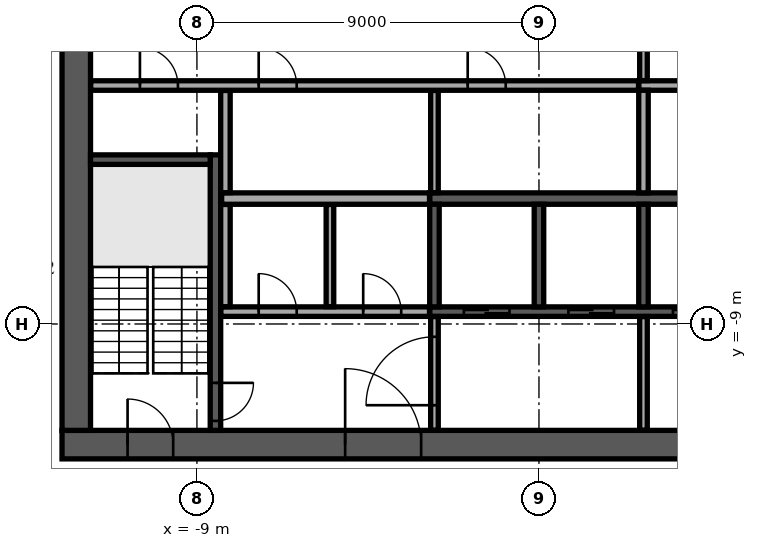
"""IFC4 building model, lengths in metres.
Left out: names, types, materials, properties, quantities, classifications, styles, units other than length and angle.
Written with IfcOpenShell. Run it as: python <this file> out.ifc"""

import sys

from ifc_helpers import new_model, si_unit, direction, frame, frame_2d, origin, place, context, subcontext, project, spatial, rectangle, extrude, element, fill, save


model = new_model("IFC4")
c1 = context("Model", 3, precision=1e-05, world=origin(), true_north=direction((0.0, 1.0)))
c2 = subcontext(c1, "Body", "Model", "MODEL_VIEW")
j1 = project(units=[si_unit("LENGTHUNIT", "METRE"), si_unit("PLANEANGLEUNIT", "RADIAN")], contexts=[c1])
p1 = place(None, origin())
s1 = spatial("IfcSite", under=j1, at=p1, CompositionType="ELEMENT")
p2 = place(p1, origin())
s2 = spatial("IfcBuilding", under=s1, at=p2, CompositionType="ELEMENT")
p3 = place(p2, frame((0.0, 0.0, 282.9)))
s3 = spatial("IfcBuildingStorey", under=s2, at=p3, CompositionType="ELEMENT", Elevation=282.9)
p4 = place(p3, frame((-12.55, -12.175, 0.0), z_axis=(0.0, 0.0, 1.0), x_axis=(1.0, 0.0, 0.0)))
e1 = element("IfcWall", 1, at=p4, inside=s3, PredefinedType="SHEAR", context=c2, shape_type="SweptSolid", body=[
    extrude(rectangle(XDim=25.1, YDim=0.75, at=frame_2d((12.55, 0.0))), origin(), (0.0, 0.0, 1.0), 3.64),
])
p5 = place(p4, frame((7.45, 0.0, 0.0)))
e2 = element("IfcOpeningElement", 2, at=p5, cuts=e1, PredefinedType="OPENING", context=c2, shape_type="SweptSolid", body=[
    extrude(rectangle(XDim=2.0, YDim=2.1, at=frame_2d((1.0, 1.05))), frame((0.0, 0.385, 0.0), z_axis=(0.0, -1.0, 0.0), x_axis=(1.0, 0.0, 0.0)), (0.0, 0.0, 1.0), 0.77),
])
p6 = place(p4, frame((17.575, 0.0, 0.0)))
e3 = element("IfcOpeningElement", 3, at=p6, cuts=e1, PredefinedType="OPENING", context=c2, shape_type="SweptSolid", body=[
    extrude(rectangle(XDim=1.2, YDim=2.1, at=frame_2d((0.6, 1.05))), frame((0.0, 0.385, 0.0), z_axis=(0.0, -1.0, 0.0), x_axis=(1.0, 0.0, 0.0)), (0.0, 0.0, 1.0), 0.77),
])
p7 = place(p4, frame((1.725, 0.0, 0.0)))
e4 = element("IfcOpeningElement", 4, at=p7, cuts=e1, PredefinedType="OPENING", context=c2, shape_type="SweptSolid", body=[
    extrude(rectangle(XDim=1.2, YDim=2.1, at=frame_2d((0.6, 1.05))), frame((0.0, 0.385, 0.0), z_axis=(0.0, -1.0, 0.0), x_axis=(1.0, 0.0, 0.0)), (0.0, 0.0, 1.0), 0.77),
])
p8 = place(p4, frame((22.175, 0.0, 0.0)))
e5 = element("IfcOpeningElement", 5, at=p8, cuts=e1, PredefinedType="OPENING", context=c2, shape_type="SweptSolid", body=[
    extrude(rectangle(XDim=1.2, YDim=2.1, at=frame_2d((0.6, 1.05))), frame((0.0, 0.385, 0.0), z_axis=(0.0, -1.0, 0.0), x_axis=(1.0, 0.0, 0.0)), (0.0, 0.0, 1.0), 0.77),
])
p9 = place(p3, frame((-12.175, -11.8, 0.0), z_axis=(0.0, 0.0, 1.0), x_axis=(0.0, 1.0, 0.0)))
e6 = element("IfcWall", 6, at=p9, inside=s3, PredefinedType="SHEAR", context=c2, shape_type="SweptSolid", body=[
    extrude(rectangle(XDim=23.6, YDim=0.75, at=frame_2d((11.8, 0.0))), origin(), (0.0, 0.0, 1.0), 3.64),
])
p10 = place(p9, frame((10.6, 0.0, 0.0)))
e7 = element("IfcOpeningElement", 7, at=p10, cuts=e6, PredefinedType="OPENING", context=c2, shape_type="SweptSolid", body=[
    extrude(rectangle(XDim=2.4, YDim=2.4, at=frame_2d((1.2, 1.2))), frame((0.0, 0.385, 0.0), z_axis=(0.0, -1.0, 0.0), x_axis=(1.0, 0.0, 0.0)), (0.0, 0.0, 1.0), 0.77),
])
p11 = place(p3, frame((-2.875, -5.7, 0.0), z_axis=(0.0, 0.0, 1.0), x_axis=(1.0, 0.0, 0.0)))
e8 = element("IfcWall", 8, at=p11, inside=s3, PredefinedType="SOLIDWALL", context=c2, shape_type="SweptSolid", body=[
    extrude(rectangle(XDim=11.25, YDim=0.3, at=frame_2d((5.625, 0.0))), origin(), (0.0, 0.0, 1.0), 3.64),
])
p12 = place(p3, frame((2.625, -2.725, 0.0), z_axis=(0.0, 0.0, 1.0), x_axis=(1.0, 0.0, 0.0)))
e9 = element("IfcWall", 9, at=p12, inside=s3, PredefinedType="SOLIDWALL", context=c2, shape_type="SweptSolid", body=[
    extrude(rectangle(XDim=3.0, YDim=0.25, at=frame_2d((1.5, 0.0))), origin(), (0.0, 0.0, 1.0), 3.64),
])
p13 = place(p3, frame((2.75, -5.55, 0.0), z_axis=(0.0, 0.0, 1.0), x_axis=(0.0, 1.0, 0.0)))
e10 = element("IfcWall", 10, at=p13, inside=s3, PredefinedType="SOLIDWALL", context=c2, shape_type="SweptSolid", body=[
    extrude(rectangle(XDim=2.7, YDim=0.25, at=frame_2d((1.35, 0.0))), origin(), (0.0, 0.0, 1.0), 3.64),
])
p14 = place(p3, frame((-2.875, -8.675, 0.0), z_axis=(0.0, 0.0, 1.0), x_axis=(1.0, 0.0, 0.0)))
e11 = element("IfcWall", 11, at=p14, inside=s3, PredefinedType="SOLIDWALL", context=c2, shape_type="SweptSolid", body=[
    extrude(rectangle(XDim=11.25, YDim=0.25, at=frame_2d((5.625, 0.0))), origin(), (0.0, 0.0, 1.0), 3.64),
])
p15 = place(p14, frame((0.9, 0.0, 0.0)))
e12 = element("IfcOpeningElement", 12, at=p15, cuts=e11, PredefinedType="OPENING", context=c2, shape_type="SweptSolid", body=[
    extrude(rectangle(XDim=1.2, YDim=2.1, at=frame_2d((0.6, 1.05))), frame((0.0, 0.135, 0.0), z_axis=(0.0, -1.0, 0.0), x_axis=(1.0, 0.0, 0.0)), (0.0, 0.0, 1.0), 0.27),
])
p16 = place(p14, frame((3.65, 0.0, 0.0)))
e13 = element("IfcOpeningElement", 13, at=p16, cuts=e11, PredefinedType="OPENING", context=c2, shape_type="SweptSolid", body=[
    extrude(rectangle(XDim=1.2, YDim=2.1, at=frame_2d((0.6, 1.05))), frame((0.0, 0.135, 0.0), z_axis=(0.0, -1.0, 0.0), x_axis=(1.0, 0.0, 0.0)), (0.0, 0.0, 1.0), 0.27),
])
p17 = place(p14, frame((6.4, 0.0, 0.0)))
e14 = element("IfcOpeningElement", 14, at=p17, cuts=e11, PredefinedType="OPENING", context=c2, shape_type="SweptSolid", body=[
    extrude(rectangle(XDim=1.2, YDim=2.1, at=frame_2d((0.6, 1.05))), frame((0.0, 0.135, 0.0), z_axis=(0.0, -1.0, 0.0), x_axis=(1.0, 0.0, 0.0)), (0.0, 0.0, 1.0), 0.27),
])
p18 = place(p14, frame((9.15, 0.0, 0.0)))
e15 = element("IfcOpeningElement", 15, at=p18, cuts=e11, PredefinedType="OPENING", context=c2, shape_type="SweptSolid", body=[
    extrude(rectangle(XDim=1.2, YDim=2.1, at=frame_2d((0.6, 1.05))), frame((0.0, 0.135, 0.0), z_axis=(0.0, -1.0, 0.0), x_axis=(1.0, 0.0, 0.0)), (0.0, 0.0, 1.0), 0.27),
])
for number, where, z_axis, x_axis in (
    (16, (-2.75, -8.55, 0.0), (0.0, 0.0, 1.0), (0.0, 1.0, 0.0)),
    (17, (0.0, -8.55, 0.0), (0.0, 0.0, 1.0), (0.0, 1.0, 0.0)),
    (18, (2.75, -8.55, 0.0), (0.0, 0.0, 1.0), (0.0, 1.0, 0.0)),
):
    element("IfcWall", number, at=place(p3, frame(where, z_axis=z_axis, x_axis=x_axis)), inside=s3, PredefinedType="SOLIDWALL", context=c2, shape_type="SweptSolid", body=[
        extrude(rectangle(XDim=2.7, YDim=0.25, at=frame_2d((1.35, 0.0))), origin(), (0.0, 0.0, 1.0), 3.64),
    ])
p19 = place(p3, frame((-8.512, -4.55, 0.0), z_axis=(0.0, 0.0, 1.0), x_axis=(0.0, -1.0, 0.0)))
e19 = element("IfcWall", 19, at=p19, inside=s3, PredefinedType="SOLIDWALL", context=c2, shape_type="SweptSolid", body=[
    extrude(rectangle(XDim=7.25, YDim=0.275, at=frame_2d((3.625, 0.0))), origin(), (0.0, 0.0, 1.0), 3.64),
])
p20 = place(p19, frame((6.0, 0.0, 0.0)))
e20 = element("IfcOpeningElement", 20, at=p20, cuts=e19, PredefinedType="OPENING", context=c2, shape_type="SweptSolid", body=[
    extrude(rectangle(XDim=1.0, YDim=2.1, at=frame_2d((0.5, 1.05))), frame((0.0, 0.147, 0.0), z_axis=(0.0, -1.0, 0.0), x_axis=(1.0, 0.0, 0.0)), (0.0, 0.0, 1.0), 0.295),
])
p21 = place(p3, frame((-8.65, -4.675, 0.0), z_axis=(0.0, 0.0, 1.0), x_axis=(-1.0, 0.0, 0.0)))
e21 = element("IfcWall", 21, at=p21, inside=s3, PredefinedType="SOLIDWALL", context=c2, shape_type="SweptSolid", body=[
    extrude(rectangle(XDim=3.15, YDim=0.25, at=frame_2d((1.575, 0.0))), origin(), (0.0, 0.0, 1.0), 3.64),
])
p22 = place(p3, frame((-2.75, -11.795, 0.0), z_axis=(0.0, 0.0, 1.0), x_axis=(0.0, 1.0, 0.0)))
e22 = element("IfcWall", 22, at=p22, inside=s3, PredefinedType="PARTITIONING", context=c2, shape_type="SweptSolid", body=[
    extrude(rectangle(XDim=2.99, YDim=0.2, at=frame_2d((1.495, 0.0))), origin(), (0.0, 0.0, 1.0), 3.64),
])
p23 = place(p22, frame((0.657, 0.0, 0.0)))
e23 = element("IfcOpeningElement", 23, at=p23, cuts=e22, PredefinedType="OPENING", context=c2, shape_type="SweptSolid", body=[
    extrude(rectangle(XDim=1.8, YDim=2.1, at=frame_2d((0.9, 1.05))), frame((0.0, 0.11, 0.0), z_axis=(0.0, -1.0, 0.0), x_axis=(1.0, 0.0, 0.0)), (0.0, 0.0, 1.0), 0.22),
])
p24 = place(p3, frame((2.75, -11.795, 0.0), z_axis=(0.0, 0.0, 1.0), x_axis=(0.0, 1.0, 0.0)))
e24 = element("IfcWall", 24, at=p24, inside=s3, PredefinedType="PARTITIONING", context=c2, shape_type="SweptSolid", body=[
    extrude(rectangle(XDim=2.99, YDim=0.2, at=frame_2d((1.495, 0.0))), origin(), (0.0, 0.0, 1.0), 3.64),
])
p25 = place(p3, frame((-8.37, -8.675, 0.0), z_axis=(0.0, 0.0, 1.0), x_axis=(1.0, 0.0, 0.0)))
e25 = element("IfcWall", 25, at=p25, inside=s3, PredefinedType="PARTITIONING", context=c2, shape_type="SweptSolid", body=[
    extrude(rectangle(XDim=5.49, YDim=0.25, at=frame_2d((2.745, 0.0))), origin(), (0.0, 0.0, 1.0), 3.64),
])
p26 = place(p25, frame((0.995, 0.0, 0.0)))
e26 = element("IfcOpeningElement", 26, at=p26, cuts=e25, PredefinedType="OPENING", context=c2, shape_type="SweptSolid", body=[
    extrude(rectangle(XDim=1.0, YDim=2.1, at=frame_2d((0.5, 1.05))), frame((0.0, 0.135, 0.0), z_axis=(0.0, -1.0, 0.0), x_axis=(1.0, 0.0, 0.0)), (0.0, 0.0, 1.0), 0.27),
])
p27 = place(p25, frame((3.745, 0.0, 0.0)))
e27 = element("IfcOpeningElement", 27, at=p27, cuts=e25, PredefinedType="OPENING", context=c2, shape_type="SweptSolid", body=[
    extrude(rectangle(XDim=1.0, YDim=2.1, at=frame_2d((0.5, 1.05))), frame((0.0, 0.135, 0.0), z_axis=(0.0, -1.0, 0.0), x_axis=(1.0, 0.0, 0.0)), (0.0, 0.0, 1.0), 0.27),
])
p28 = place(p3, frame((-8.25, -8.545, 0.0), z_axis=(0.0, 0.0, 1.0), x_axis=(0.0, 1.0, 0.0)))
e28 = element("IfcWall", 28, at=p28, inside=s3, PredefinedType="PARTITIONING", context=c2, shape_type="SweptSolid", body=[
    extrude(rectangle(XDim=2.69, YDim=0.25, at=frame_2d((1.345, 0.0))), origin(), (0.0, 0.0, 1.0), 3.64),
])
p29 = place(p3, frame((-5.5, -8.545, 0.0), z_axis=(0.0, 0.0, 1.0), x_axis=(0.0, 1.0, 0.0)))
e29 = element("IfcWall", 29, at=p29, inside=s3, PredefinedType="PARTITIONING", context=c2, shape_type="SweptSolid", body=[
    extrude(rectangle(XDim=2.69, YDim=0.2, at=frame_2d((1.345, 0.0))), origin(), (0.0, 0.0, 1.0), 3.64),
])
p30 = place(p3, frame((-8.35, -5.7, 0.0), z_axis=(0.0, 0.0, 1.0), x_axis=(1.0, 0.0, 0.0)))
e30 = element("IfcWall", 30, at=p30, inside=s3, PredefinedType="PARTITIONING", context=c2, shape_type="SweptSolid", body=[
    extrude(rectangle(XDim=5.47, YDim=0.3, at=frame_2d((2.735, 0.0))), origin(), (0.0, 0.0, 1.0), 3.64),
])
p31 = place(p3, frame((-8.25, -5.545, 0.0), z_axis=(0.0, 0.0, 1.0), x_axis=(0.0, 1.0, 0.0)))
e31 = element("IfcWall", 31, at=p31, inside=s3, PredefinedType="PARTITIONING", context=c2, shape_type="SweptSolid", body=[
    extrude(rectangle(XDim=2.69, YDim=0.25, at=frame_2d((1.345, 0.0))), origin(), (0.0, 0.0, 1.0), 3.64),
])
p32 = place(p3, frame((-2.75, -5.545, 0.0), z_axis=(0.0, 0.0, 1.0), x_axis=(0.0, 1.0, 0.0)))
e32 = element("IfcWall", 32, at=p32, inside=s3, PredefinedType="PARTITIONING", context=c2, shape_type="SweptSolid", body=[
    extrude(rectangle(XDim=2.69, YDim=0.2, at=frame_2d((1.345, 0.0))), origin(), (0.0, 0.0, 1.0), 3.64),
])
p33 = place(p3, frame((-11.795, -2.725, 0.0), z_axis=(0.0, 0.0, 1.0), x_axis=(1.0, 0.0, 0.0)))
e33 = element("IfcWall", 33, at=p33, inside=s3, PredefinedType="PARTITIONING", context=c2, shape_type="SweptSolid", body=[
    extrude(rectangle(XDim=14.415, YDim=0.25, at=frame_2d((7.208, 0.0))), origin(), (0.0, 0.0, 1.0), 3.64),
])
p34 = place(p33, frame((1.295, 0.0, 0.0)))
e34 = element("IfcOpeningElement", 34, at=p34, cuts=e33, PredefinedType="OPENING", context=c2, shape_type="SweptSolid", body=[
    extrude(rectangle(XDim=1.0, YDim=2.1, at=frame_2d((0.5, 1.05))), frame((0.0, 0.135, 0.0), z_axis=(0.0, -1.0, 0.0), x_axis=(1.0, 0.0, 0.0)), (0.0, 0.0, 1.0), 0.27),
])
p35 = place(p33, frame((4.42, 0.0, 0.0)))
e35 = element("IfcOpeningElement", 35, at=p35, cuts=e33, PredefinedType="OPENING", context=c2, shape_type="SweptSolid", body=[
    extrude(rectangle(XDim=1.0, YDim=2.1, at=frame_2d((0.5, 1.05))), frame((0.0, 0.135, 0.0), z_axis=(0.0, -1.0, 0.0), x_axis=(1.0, 0.0, 0.0)), (0.0, 0.0, 1.0), 0.27),
])
p36 = place(p33, frame((9.92, 0.0, 0.0)))
e36 = element("IfcOpeningElement", 36, at=p36, cuts=e33, PredefinedType="OPENING", context=c2, shape_type="SweptSolid", body=[
    extrude(rectangle(XDim=1.0, YDim=2.1, at=frame_2d((0.5, 1.05))), frame((0.0, 0.135, 0.0), z_axis=(0.0, -1.0, 0.0), x_axis=(1.0, 0.0, 0.0)), (0.0, 0.0, 1.0), 0.27),
])
p37 = place(p3, frame((2.75, -2.595, 0.0), z_axis=(0.0, 0.0, 1.0), x_axis=(0.0, 1.0, 0.0)))
e37 = element("IfcWall", 37, at=p37, inside=s3, PredefinedType="PARTITIONING", context=c2, shape_type="SweptSolid", body=[
    extrude(rectangle(XDim=5.19, YDim=0.2, at=frame_2d((2.595, 0.0))), origin(), (0.0, 0.0, 1.0), 3.64),
])
p38 = place(p37, frame((1.395, 0.0, 0.0)))
e38 = element("IfcOpeningElement", 38, at=p38, cuts=e37, PredefinedType="OPENING", context=c2, shape_type="SweptSolid", body=[
    extrude(rectangle(XDim=2.4, YDim=2.4, at=frame_2d((1.2, 1.2))), frame((0.0, 0.11, 0.0), z_axis=(0.0, -1.0, 0.0), x_axis=(1.0, 0.0, 0.0)), (0.0, 0.0, 1.0), 0.22),
])
p39 = place(p3, frame((-10.292, 32.278, 0.0), z_axis=(0.0, 0.0, 1.0), x_axis=(-0.438370550468, -0.898794337144, 0.0)))
e39 = element("IfcWall", 39, at=p39, inside=s3, PredefinedType="STANDARD", context=c2, shape_type="SweptSolid", body=[
    extrude(rectangle(XDim=48.843, YDim=0.6, at=frame_2d((24.421, 0.0))), origin(), (0.0, 0.0, 1.0), 3.64),
])
p40 = place(p39, frame((1.22, 0.0, 0.9)))
e40 = element("IfcOpeningElement", 40, at=p40, cuts=e39, PredefinedType="OPENING", context=c2, shape_type="SweptSolid", body=[
    extrude(rectangle(XDim=2.0, YDim=2.1, at=frame_2d((1.0, 1.05))), frame((0.0, 0.31, 0.0), z_axis=(0.0, -1.0, 0.0), x_axis=(1.0, 0.0, 0.0)), (0.0, 0.0, 1.0), 0.62),
])
p41 = place(p39, frame((5.66, 0.0, 0.9)))
e41 = element("IfcOpeningElement", 41, at=p41, cuts=e39, PredefinedType="OPENING", context=c2, shape_type="SweptSolid", body=[
    extrude(rectangle(XDim=2.0, YDim=2.1, at=frame_2d((1.0, 1.05))), frame((0.0, 0.31, 0.0), z_axis=(0.0, -1.0, 0.0), x_axis=(1.0, 0.0, 0.0)), (0.0, 0.0, 1.0), 0.62),
])
p42 = place(p39, frame((10.101, 0.0, 0.9)))
e42 = element("IfcOpeningElement", 42, at=p42, cuts=e39, PredefinedType="OPENING", context=c2, shape_type="SweptSolid", body=[
    extrude(rectangle(XDim=2.0, YDim=2.1, at=frame_2d((1.0, 1.05))), frame((0.0, 0.31, 0.0), z_axis=(0.0, -1.0, 0.0), x_axis=(1.0, 0.0, 0.0)), (0.0, 0.0, 1.0), 0.62),
])
p43 = place(p39, frame((14.541, 0.0, 0.9)))
e43 = element("IfcOpeningElement", 43, at=p43, cuts=e39, PredefinedType="OPENING", context=c2, shape_type="SweptSolid", body=[
    extrude(rectangle(XDim=2.0, YDim=2.1, at=frame_2d((1.0, 1.05))), frame((0.0, 0.31, 0.0), z_axis=(0.0, -1.0, 0.0), x_axis=(1.0, 0.0, 0.0)), (0.0, 0.0, 1.0), 0.62),
])
p44 = place(p39, frame((18.981, 0.0, 0.9)))
e44 = element("IfcOpeningElement", 44, at=p44, cuts=e39, PredefinedType="OPENING", context=c2, shape_type="SweptSolid", body=[
    extrude(rectangle(XDim=2.0, YDim=2.1, at=frame_2d((1.0, 1.05))), frame((0.0, 0.31, 0.0), z_axis=(0.0, -1.0, 0.0), x_axis=(1.0, 0.0, 0.0)), (0.0, 0.0, 1.0), 0.62),
])
p45 = place(p39, frame((23.422, 0.0, 0.9)))
e45 = element("IfcOpeningElement", 45, at=p45, cuts=e39, PredefinedType="OPENING", context=c2, shape_type="SweptSolid", body=[
    extrude(rectangle(XDim=2.0, YDim=2.1, at=frame_2d((1.0, 1.05))), frame((0.0, 0.31, 0.0), z_axis=(0.0, -1.0, 0.0), x_axis=(1.0, 0.0, 0.0)), (0.0, 0.0, 1.0), 0.62),
])
p46 = place(p39, frame((27.862, 0.0, 0.9)))
e46 = element("IfcOpeningElement", 46, at=p46, cuts=e39, PredefinedType="OPENING", context=c2, shape_type="SweptSolid", body=[
    extrude(rectangle(XDim=2.0, YDim=2.1, at=frame_2d((1.0, 1.05))), frame((0.0, 0.31, 0.0), z_axis=(0.0, -1.0, 0.0), x_axis=(1.0, 0.0, 0.0)), (0.0, 0.0, 1.0), 0.62),
])
p47 = place(p39, frame((32.302, 0.0, 0.9)))
e47 = element("IfcOpeningElement", 47, at=p47, cuts=e39, PredefinedType="OPENING", context=c2, shape_type="SweptSolid", body=[
    extrude(rectangle(XDim=2.0, YDim=2.1, at=frame_2d((1.0, 1.05))), frame((0.0, 0.31, 0.0), z_axis=(0.0, -1.0, 0.0), x_axis=(1.0, 0.0, 0.0)), (0.0, 0.0, 1.0), 0.62),
])
p48 = place(p39, frame((36.742, 0.0, 0.9)))
e48 = element("IfcOpeningElement", 48, at=p48, cuts=e39, PredefinedType="OPENING", context=c2, shape_type="SweptSolid", body=[
    extrude(rectangle(XDim=2.0, YDim=2.1, at=frame_2d((1.0, 1.05))), frame((0.0, 0.31, 0.0), z_axis=(0.0, -1.0, 0.0), x_axis=(1.0, 0.0, 0.0)), (0.0, 0.0, 1.0), 0.62),
])
p49 = place(p39, frame((41.183, 0.0, 0.9)))
e49 = element("IfcOpeningElement", 49, at=p49, cuts=e39, PredefinedType="OPENING", context=c2, shape_type="SweptSolid", body=[
    extrude(rectangle(XDim=2.0, YDim=2.1, at=frame_2d((1.0, 1.05))), frame((0.0, 0.31, 0.0), z_axis=(0.0, -1.0, 0.0), x_axis=(1.0, 0.0, 0.0)), (0.0, 0.0, 1.0), 0.62),
])
p50 = place(p39, frame((45.623, 0.0, 0.9)))
e50 = element("IfcOpeningElement", 50, at=p50, cuts=e39, PredefinedType="OPENING", context=c2, shape_type="SweptSolid", body=[
    extrude(rectangle(XDim=2.0, YDim=2.1, at=frame_2d((1.0, 1.05))), frame((0.0, 0.31, 0.0), z_axis=(0.0, -1.0, 0.0), x_axis=(1.0, 0.0, 0.0)), (0.0, 0.0, 1.0), 0.62),
])
p51 = place(p3, frame((-26.175, -8.898, 0.0), z_axis=(0.0, 0.0, 1.0), x_axis=(0.898795233888, -0.438368711864, 0.0)))
e51 = element("IfcWall", 51, at=p51, inside=s3, PredefinedType="PARTITIONING", context=c2, shape_type="SweptSolid", body=[
    extrude(rectangle(XDim=39.325, YDim=0.15, at=frame_2d((19.663, 0.0))), origin(), (0.0, 0.0, 1.0), 3.04),
])
p52 = place(p51, frame((5.8, 0.0, 0.0)))
e52 = element("IfcOpeningElement", 52, at=p52, cuts=e51, PredefinedType="OPENING", context=c2, shape_type="SweptSolid", body=[
    extrude(rectangle(XDim=1.8, YDim=2.1, at=frame_2d((0.9, 1.05))), frame((0.0, 0.085, 0.0), z_axis=(0.0, -1.0, 0.0), x_axis=(1.0, 0.0, 0.0)), (0.0, 0.0, 1.0), 0.17),
])
p53 = place(p51, frame((10.827, 0.0, 0.0)))
e53 = element("IfcOpeningElement", 53, at=p53, cuts=e51, PredefinedType="OPENING", context=c2, shape_type="SweptSolid", body=[
    extrude(rectangle(XDim=1.0, YDim=2.1, at=frame_2d((0.5, 1.05))), frame((0.0, 0.085, 0.0), z_axis=(0.0, -1.0, 0.0), x_axis=(1.0, 0.0, 0.0)), (0.0, 0.0, 1.0), 0.17),
])
p54 = place(p51, frame((23.556, 0.0, 0.0)))
e54 = element("IfcOpeningElement", 54, at=p54, cuts=e51, PredefinedType="OPENING", context=c2, shape_type="SweptSolid", body=[
    extrude(rectangle(XDim=1.0, YDim=2.1, at=frame_2d((0.5, 1.05))), frame((0.0, 0.085, 0.0), z_axis=(0.0, -1.0, 0.0), x_axis=(1.0, 0.0, 0.0)), (0.0, 0.0, 1.0), 0.17),
])
p55 = place(p5, origin())
e55 = element("IfcDoor", 55, at=p55, inside=s3, OperationType="SINGLE_SWING_LEFT", PredefinedType="DOOR", context=c2, shape_type="SweptSolid", body=[
    extrude(rectangle(XDim=2.0, YDim=2.1, at=frame_2d((1.0, 1.05))), frame((0.0, 0.025, 0.0), z_axis=(0.0, -1.0, 0.0), x_axis=(1.0, 0.0, 0.0)), (0.0, 0.0, 1.0), 0.05),
])
fill(e2, e55)
p56 = place(p7, origin())
e56 = element("IfcDoor", 56, at=p56, inside=s3, OperationType="SINGLE_SWING_LEFT", PredefinedType="DOOR", context=c2, shape_type="SweptSolid", body=[
    extrude(rectangle(XDim=1.2, YDim=2.1, at=frame_2d((0.6, 1.05))), frame((0.0, 0.025, 0.0), z_axis=(0.0, -1.0, 0.0), x_axis=(1.0, 0.0, 0.0)), (0.0, 0.0, 1.0), 0.05),
])
fill(e4, e56)
p57 = place(p15, origin())
e57 = element("IfcDoor", 57, at=p57, inside=s3, OperationType="DOUBLE_DOOR_SLIDING", PredefinedType="DOOR", context=c2, shape_type="SweptSolid", body=[
    extrude(rectangle(XDim=1.2, YDim=2.1, at=frame_2d((0.6, 1.05))), frame((0.0, 0.025, 0.0), z_axis=(0.0, -1.0, 0.0), x_axis=(1.0, 0.0, 0.0)), (0.0, 0.0, 1.0), 0.05),
])
fill(e12, e57)
p58 = place(p16, origin())
e58 = element("IfcDoor", 58, at=p58, inside=s3, OperationType="DOUBLE_DOOR_SLIDING", PredefinedType="DOOR", context=c2, shape_type="SweptSolid", body=[
    extrude(rectangle(XDim=1.2, YDim=2.1, at=frame_2d((0.6, 1.05))), frame((0.0, 0.025, 0.0), z_axis=(0.0, -1.0, 0.0), x_axis=(1.0, 0.0, 0.0)), (0.0, 0.0, 1.0), 0.05),
])
fill(e13, e58)
p59 = place(p17, origin())
e59 = element("IfcDoor", 59, at=p59, inside=s3, OperationType="DOUBLE_DOOR_SLIDING", PredefinedType="DOOR", context=c2, shape_type="SweptSolid", body=[
    extrude(rectangle(XDim=1.2, YDim=2.1, at=frame_2d((0.6, 1.05))), frame((0.0, 0.025, 0.0), z_axis=(0.0, -1.0, 0.0), x_axis=(1.0, 0.0, 0.0)), (0.0, 0.0, 1.0), 0.05),
])
fill(e14, e59)
p60 = place(p20, origin())
e60 = element("IfcDoor", 60, at=p60, inside=s3, OperationType="SINGLE_SWING_LEFT", PredefinedType="DOOR", context=c2, shape_type="SweptSolid", body=[
    extrude(rectangle(XDim=1.0, YDim=2.1, at=frame_2d((0.5, 1.05))), frame((0.0, 0.025, 0.0), z_axis=(0.0, -1.0, 0.0), x_axis=(1.0, 0.0, 0.0)), (0.0, 0.0, 1.0), 0.05),
])
fill(e20, e60)
p61 = place(p26, origin())
e61 = element("IfcDoor", 61, at=p61, inside=s3, OperationType="SINGLE_SWING_RIGHT", PredefinedType="DOOR", context=c2, shape_type="SweptSolid", body=[
    extrude(rectangle(XDim=1.0, YDim=2.1, at=frame_2d((0.5, 1.05))), frame((0.0, 0.025, 0.0), z_axis=(0.0, -1.0, 0.0), x_axis=(1.0, 0.0, 0.0)), (0.0, 0.0, 1.0), 0.05),
])
fill(e26, e61)
p62 = place(p27, origin())
e62 = element("IfcDoor", 62, at=p62, inside=s3, OperationType="SINGLE_SWING_RIGHT", PredefinedType="DOOR", context=c2, shape_type="SweptSolid", body=[
    extrude(rectangle(XDim=1.0, YDim=2.1, at=frame_2d((0.5, 1.05))), frame((0.0, 0.025, 0.0), z_axis=(0.0, -1.0, 0.0), x_axis=(1.0, 0.0, 0.0)), (0.0, 0.0, 1.0), 0.05),
])
fill(e27, e62)
p63 = place(p34, origin())
e63 = element("IfcDoor", 63, at=p63, inside=s3, OperationType="SINGLE_SWING_RIGHT", PredefinedType="DOOR", context=c2, shape_type="SweptSolid", body=[
    extrude(rectangle(XDim=1.0, YDim=2.1, at=frame_2d((0.5, 1.05))), frame((0.0, 0.025, 0.0), z_axis=(0.0, -1.0, 0.0), x_axis=(1.0, 0.0, 0.0)), (0.0, 0.0, 1.0), 0.05),
])
fill(e34, e63)
p64 = place(p35, origin())
e64 = element("IfcDoor", 64, at=p64, inside=s3, OperationType="SINGLE_SWING_RIGHT", PredefinedType="DOOR", context=c2, shape_type="SweptSolid", body=[
    extrude(rectangle(XDim=1.0, YDim=2.1, at=frame_2d((0.5, 1.05))), frame((0.0, 0.025, 0.0), z_axis=(0.0, -1.0, 0.0), x_axis=(1.0, 0.0, 0.0)), (0.0, 0.0, 1.0), 0.05),
])
fill(e35, e64)
p65 = place(p36, origin())
e65 = element("IfcDoor", 65, at=p65, inside=s3, OperationType="SINGLE_SWING_RIGHT", PredefinedType="DOOR", context=c2, shape_type="SweptSolid", body=[
    extrude(rectangle(XDim=1.0, YDim=2.1, at=frame_2d((0.5, 1.05))), frame((0.0, 0.025, 0.0), z_axis=(0.0, -1.0, 0.0), x_axis=(1.0, 0.0, 0.0)), (0.0, 0.0, 1.0), 0.05),
])
fill(e36, e65)
p66 = place(p23, origin())
e66 = element("IfcDoor", 66, at=p66, inside=s3, OperationType="SINGLE_SWING_LEFT", PredefinedType="DOOR", context=c2, shape_type="SweptSolid", body=[
    extrude(rectangle(XDim=1.8, YDim=2.1, at=frame_2d((0.9, 1.05))), frame((0.0, 0.025, 0.0), z_axis=(0.0, -1.0, 0.0), x_axis=(1.0, 0.0, 0.0)), (0.0, 0.0, 1.0), 0.05),
])
fill(e23, e66)
save(model, sys.argv[1])
